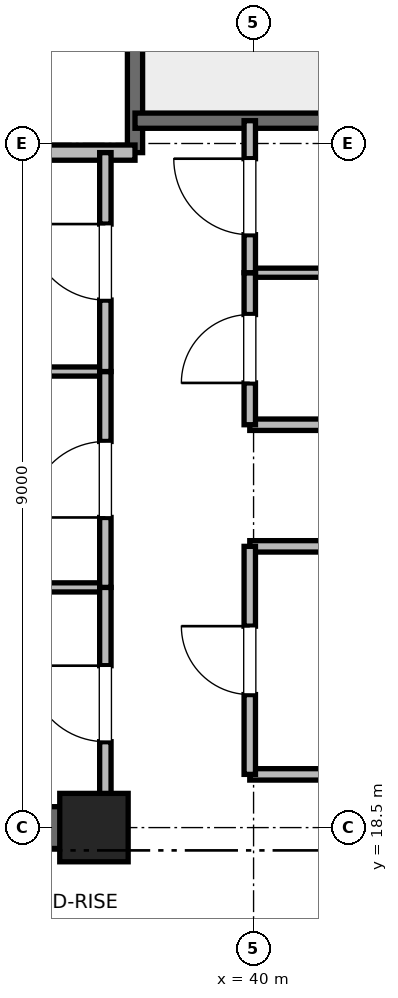
"""IFC4 building model, lengths in metres.
Left out: names, types, materials, properties, quantities, classifications, styles, units other than length and angle.
Written with IfcOpenShell. Run it as: python <this file> out.ifc"""

import sys

from ifc_helpers import new_model, si_unit, direction, frame, frame_2d, origin, origin_2d, place, context, subcontext, project, spatial, rectangle, extrude, element, fill, save


model = new_model("IFC4")
c1 = context("Model", 3, precision=1e-05, world=origin(), true_north=direction((0.0, 1.0)))
c2 = subcontext(c1, "Body", "Model", "MODEL_VIEW")
j1 = project(units=[si_unit("LENGTHUNIT", "METRE"), si_unit("PLANEANGLEUNIT", "RADIAN")], contexts=[c1])
p1 = place(None, origin())
s1 = spatial("IfcSite", under=j1, at=p1, CompositionType="ELEMENT")
p2 = place(p1, origin())
s2 = spatial("IfcBuilding", under=s1, at=p2, CompositionType="ELEMENT")
p3 = place(p2, frame((0.0, 0.0, 184.4)))
s3 = spatial("IfcBuildingStorey", under=s2, at=p3, CompositionType="ELEMENT", Elevation=184.4)
p4 = place(p3, frame((37.9, 18.5, 0.0), z_axis=(0.0, 0.0, 1.0), x_axis=(1.0, 0.0, 0.0)))
e1 = element("IfcColumn", 1, at=p4, inside=s3, PredefinedType="PILASTER", context=c2, shape_type="SweptSolid", body=[
    extrude(rectangle(XDim=0.9, YDim=0.9, at=origin_2d()), origin(), (0.0, 0.0, 1.0), 5.0),
])
p5 = place(p3, frame((29.0, 18.5, 0.0), z_axis=(0.0, 0.0, 1.0), x_axis=(1.0, 0.0, 0.0)))
e2 = element("IfcWall", 2, at=p5, inside=s3, PredefinedType="SHEAR", context=c2, shape_type="SweptSolid", body=[
    extrude(rectangle(XDim=9.2, YDim=0.55, at=frame_2d((4.6, 0.0))), origin(), (0.0, 0.0, 1.0), 4.7),
])
p6 = place(p3, frame((38.44, 27.38, 0.0), z_axis=(0.0, 0.0, 1.0), x_axis=(0.0, 1.0, 0.0)))
e3 = element("IfcWall", 3, at=p6, inside=s3, PredefinedType="SOLIDWALL", context=c2, shape_type="SweptSolid", body=[
    extrude(rectangle(XDim=8.87, YDim=0.2, at=frame_2d((4.435, 0.0))), origin(), (0.0, 0.0, 1.0), 4.7),
])
p7 = place(p3, frame((38.44, 27.8, 0.0), z_axis=(0.0, 0.0, 1.0), x_axis=(1.0, 0.0, 0.0)))
e4 = element("IfcWall", 4, at=p7, inside=s3, PredefinedType="SOLIDWALL", context=c2, shape_type="SweptSolid", body=[
    extrude(rectangle(XDim=3.32, YDim=0.2, at=frame_2d((1.66, 0.0))), origin(), (0.0, 0.0, 1.0), 4.7),
])
p8 = place(p3, frame((32.82, 27.38, 0.0), z_axis=(0.0, 0.0, 1.0), x_axis=(1.0, 0.0, 0.0)))
e5 = element("IfcWall", 5, at=p8, inside=s3, PredefinedType="PARTITIONING", context=c2, shape_type="SweptSolid", body=[
    extrude(rectangle(XDim=5.62, YDim=0.2, at=frame_2d((2.81, 0.0))), origin(), (0.0, 0.0, 1.0), 4.7),
])
for number, where, z_axis, x_axis in (
    (6, (39.95, 19.2, 0.0), (0.0, 0.0, 1.0), (1.0, 0.0, 0.0)),
    (7, (39.95, 22.2, 0.0), (0.0, 0.0, 1.0), (1.0, 0.0, 0.0)),
    (8, (39.95, 23.8, 0.0), (0.0, 0.0, 1.0), (1.0, 0.0, 0.0)),
):
    element("IfcWall", number, at=place(p3, frame(where, z_axis=z_axis, x_axis=x_axis)), inside=s3, PredefinedType="PARTITIONING", context=c2, shape_type="SweptSolid", body=[
        extrude(rectangle(XDim=1.81, YDim=0.15, at=frame_2d((0.905, 0.0))), origin(), (0.0, 0.0, 1.0), 2.85),
    ])
p9 = place(p3, frame((39.95, 25.8, 0.0), z_axis=(0.0, 0.0, 1.0), x_axis=(1.0, 0.0, 0.0)))
e9 = element("IfcWall", 9, at=p9, inside=s3, PredefinedType="PARTITIONING", context=c2, shape_type="SweptSolid", body=[
    extrude(rectangle(XDim=1.81, YDim=0.12, at=frame_2d((0.905, 0.0))), origin(), (0.0, 0.0, 1.0), 2.85),
])
p10 = place(p3, frame((39.95, 19.2, 0.0), z_axis=(0.0, 0.0, 1.0), x_axis=(0.0, 1.0, 0.0)))
e10 = element("IfcWall", 10, at=p10, inside=s3, PredefinedType="PARTITIONING", context=c2, shape_type="SweptSolid", body=[
    extrude(rectangle(XDim=3.0, YDim=0.15, at=frame_2d((1.5, 0.0))), origin(), (0.0, 0.0, 1.0), 2.85),
])
p11 = place(p10, frame((1.05, 0.0, 0.0)))
e11 = element("IfcOpeningElement", 11, at=p11, cuts=e10, PredefinedType="OPENING", context=c2, shape_type="SweptSolid", body=[
    extrude(rectangle(XDim=0.9, YDim=2.1, at=frame_2d((0.45, 1.05))), frame((0.0, 0.075, 0.0), z_axis=(0.0, -1.0, 0.0), x_axis=(1.0, 0.0, 0.0)), (0.0, 0.0, 1.0), 0.15),
])
p12 = place(p3, frame((39.95, 23.8, 0.0), z_axis=(0.0, 0.0, 1.0), x_axis=(0.0, 1.0, 0.0)))
e12 = element("IfcWall", 12, at=p12, inside=s3, PredefinedType="PARTITIONING", context=c2, shape_type="SweptSolid", body=[
    extrude(rectangle(XDim=2.0, YDim=0.15, at=frame_2d((1.0, 0.0))), origin(), (0.0, 0.0, 1.0), 2.85),
])
p13 = place(p12, frame((0.55, 0.0, 0.0)))
e13 = element("IfcOpeningElement", 13, at=p13, cuts=e12, PredefinedType="OPENING", context=c2, shape_type="SweptSolid", body=[
    extrude(rectangle(XDim=0.9, YDim=2.1, at=frame_2d((0.45, 1.05))), frame((0.0, 0.075, 0.0), z_axis=(0.0, -1.0, 0.0), x_axis=(1.0, 0.0, 0.0)), (0.0, 0.0, 1.0), 0.15),
])
p14 = place(p3, frame((39.95, 25.8, 0.0), z_axis=(0.0, 0.0, 1.0), x_axis=(0.0, 1.0, 0.0)))
e14 = element("IfcWall", 14, at=p14, inside=s3, PredefinedType="PARTITIONING", context=c2, shape_type="SweptSolid", body=[
    extrude(rectangle(XDim=2.0, YDim=0.15, at=frame_2d((1.0, 0.0))), origin(), (0.0, 0.0, 1.0), 2.85),
])
p15 = place(p14, frame((0.5, 0.0, 0.0)))
e15 = element("IfcOpeningElement", 15, at=p15, cuts=e14, PredefinedType="OPENING", context=c2, shape_type="SweptSolid", body=[
    extrude(rectangle(XDim=1.0, YDim=2.15, at=frame_2d((0.5, 1.075))), frame((0.0, 0.075, 0.0), z_axis=(0.0, -1.0, 0.0), x_axis=(1.0, 0.0, 0.0)), (0.0, 0.0, 1.0), 0.15),
])
for number, where, z_axis, x_axis in (
    (16, (32.82, 21.66, 0.0), (0.0, 0.0, 1.0), (1.0, 0.0, 0.0)),
    (17, (32.82, 24.5, 0.0), (0.0, 0.0, 1.0), (1.0, 0.0, 0.0)),
):
    element("IfcWall", number, at=place(p3, frame(where, z_axis=z_axis, x_axis=x_axis)), inside=s3, PredefinedType="PARTITIONING", context=c2, shape_type="SweptSolid", body=[
        extrude(rectangle(XDim=5.23, YDim=0.12, at=frame_2d((2.615, 0.0))), origin(), (0.0, 0.0, 1.0), 2.85),
    ])
p16 = place(p3, frame((38.05, 18.6, 0.0), z_axis=(0.0, 0.0, 1.0), x_axis=(0.0, 1.0, 0.0)))
e18 = element("IfcWall", 18, at=p16, inside=s3, PredefinedType="PARTITIONING", context=c2, shape_type="SweptSolid", body=[
    extrude(rectangle(XDim=3.06, YDim=0.15, at=frame_2d((1.53, 0.0))), origin(), (0.0, 0.0, 1.0), 2.85),
])
p17 = place(p16, frame((1.03, 0.0, 0.0)))
e19 = element("IfcOpeningElement", 19, at=p17, cuts=e18, PredefinedType="OPENING", context=c2, shape_type="SweptSolid", body=[
    extrude(rectangle(XDim=1.0, YDim=2.15, at=frame_2d((0.5, 1.075))), frame((0.0, 0.075, 0.0), z_axis=(0.0, -1.0, 0.0), x_axis=(1.0, 0.0, 0.0)), (0.0, 0.0, 1.0), 0.15),
])
p18 = place(p3, frame((38.05, 21.66, 0.0), z_axis=(0.0, 0.0, 1.0), x_axis=(0.0, 1.0, 0.0)))
e20 = element("IfcWall", 20, at=p18, inside=s3, PredefinedType="PARTITIONING", context=c2, shape_type="SweptSolid", body=[
    extrude(rectangle(XDim=2.84, YDim=0.15, at=frame_2d((1.42, 0.0))), origin(), (0.0, 0.0, 1.0), 2.85),
])
p19 = place(p18, frame((0.92, 0.0, 0.0)))
e21 = element("IfcOpeningElement", 21, at=p19, cuts=e20, PredefinedType="OPENING", context=c2, shape_type="SweptSolid", body=[
    extrude(rectangle(XDim=1.0, YDim=2.15, at=frame_2d((0.5, 1.075))), frame((0.0, 0.075, 0.0), z_axis=(0.0, -1.0, 0.0), x_axis=(1.0, 0.0, 0.0)), (0.0, 0.0, 1.0), 0.15),
])
p20 = place(p3, frame((38.05, 24.5, 0.0), z_axis=(0.0, 0.0, 1.0), x_axis=(0.0, 1.0, 0.0)))
e22 = element("IfcWall", 22, at=p20, inside=s3, PredefinedType="PARTITIONING", context=c2, shape_type="SweptSolid", body=[
    extrude(rectangle(XDim=2.88, YDim=0.15, at=frame_2d((1.44, 0.0))), origin(), (0.0, 0.0, 1.0), 2.85),
])
p21 = place(p20, frame((0.94, 0.0, 0.0)))
e23 = element("IfcOpeningElement", 23, at=p21, cuts=e22, PredefinedType="OPENING", context=c2, shape_type="SweptSolid", body=[
    extrude(rectangle(XDim=1.0, YDim=2.15, at=frame_2d((0.5, 1.075))), frame((0.0, 0.075, 0.0), z_axis=(0.0, -1.0, 0.0), x_axis=(1.0, 0.0, 0.0)), (0.0, 0.0, 1.0), 0.15),
])
p22 = place(p11, origin())
e24 = element("IfcDoor", 24, at=p22, inside=s3, OperationType="SINGLE_SWING_RIGHT", PredefinedType="DOOR", context=c2, shape_type="SweptSolid", body=[
    extrude(rectangle(XDim=0.9, YDim=2.1, at=frame_2d((0.45, 1.05))), frame((0.0, 0.025, 0.0), z_axis=(0.0, -1.0, 0.0), x_axis=(1.0, 0.0, 0.0)), (0.0, 0.0, 1.0), 0.05),
])
fill(e11, e24)
p23 = place(p13, origin())
e25 = element("IfcDoor", 25, at=p23, inside=s3, OperationType="SINGLE_SWING_LEFT", PredefinedType="DOOR", context=c2, shape_type="SweptSolid", body=[
    extrude(rectangle(XDim=0.9, YDim=2.1, at=frame_2d((0.45, 1.05))), frame((0.0, 0.025, 0.0), z_axis=(0.0, -1.0, 0.0), x_axis=(1.0, 0.0, 0.0)), (0.0, 0.0, 1.0), 0.05),
])
fill(e13, e25)
p24 = place(p15, origin())
e26 = element("IfcDoor", 26, at=p24, inside=s3, OperationType="SINGLE_SWING_RIGHT", PredefinedType="DOOR", context=c2, shape_type="SweptSolid", body=[
    extrude(rectangle(XDim=1.0, YDim=2.15, at=frame_2d((0.5, 1.075))), frame((0.0, 0.025, 0.0), z_axis=(0.0, -1.0, 0.0), x_axis=(1.0, 0.0, 0.0)), (0.0, 0.0, 1.0), 0.05),
])
fill(e15, e26)
p25 = place(p17, origin())
e27 = element("IfcDoor", 27, at=p25, inside=s3, OperationType="SINGLE_SWING_RIGHT", PredefinedType="DOOR", context=c2, shape_type="SweptSolid", body=[
    extrude(rectangle(XDim=1.0, YDim=2.15, at=frame_2d((0.5, 1.075))), frame((0.0, 0.025, 0.0), z_axis=(0.0, -1.0, 0.0), x_axis=(1.0, 0.0, 0.0)), (0.0, 0.0, 1.0), 0.05),
])
fill(e19, e27)
p26 = place(p19, origin())
e28 = element("IfcDoor", 28, at=p26, inside=s3, OperationType="SINGLE_SWING_LEFT", PredefinedType="DOOR", context=c2, shape_type="SweptSolid", body=[
    extrude(rectangle(XDim=1.0, YDim=2.15, at=frame_2d((0.5, 1.075))), frame((0.0, 0.025, 0.0), z_axis=(0.0, -1.0, 0.0), x_axis=(1.0, 0.0, 0.0)), (0.0, 0.0, 1.0), 0.05),
])
fill(e21, e28)
p27 = place(p21, origin())
e29 = element("IfcDoor", 29, at=p27, inside=s3, OperationType="SINGLE_SWING_RIGHT", PredefinedType="DOOR", context=c2, shape_type="SweptSolid", body=[
    extrude(rectangle(XDim=1.0, YDim=2.15, at=frame_2d((0.5, 1.075))), frame((0.0, 0.025, 0.0), z_axis=(0.0, -1.0, 0.0), x_axis=(1.0, 0.0, 0.0)), (0.0, 0.0, 1.0), 0.05),
])
fill(e23, e29)
save(model, sys.argv[1])
